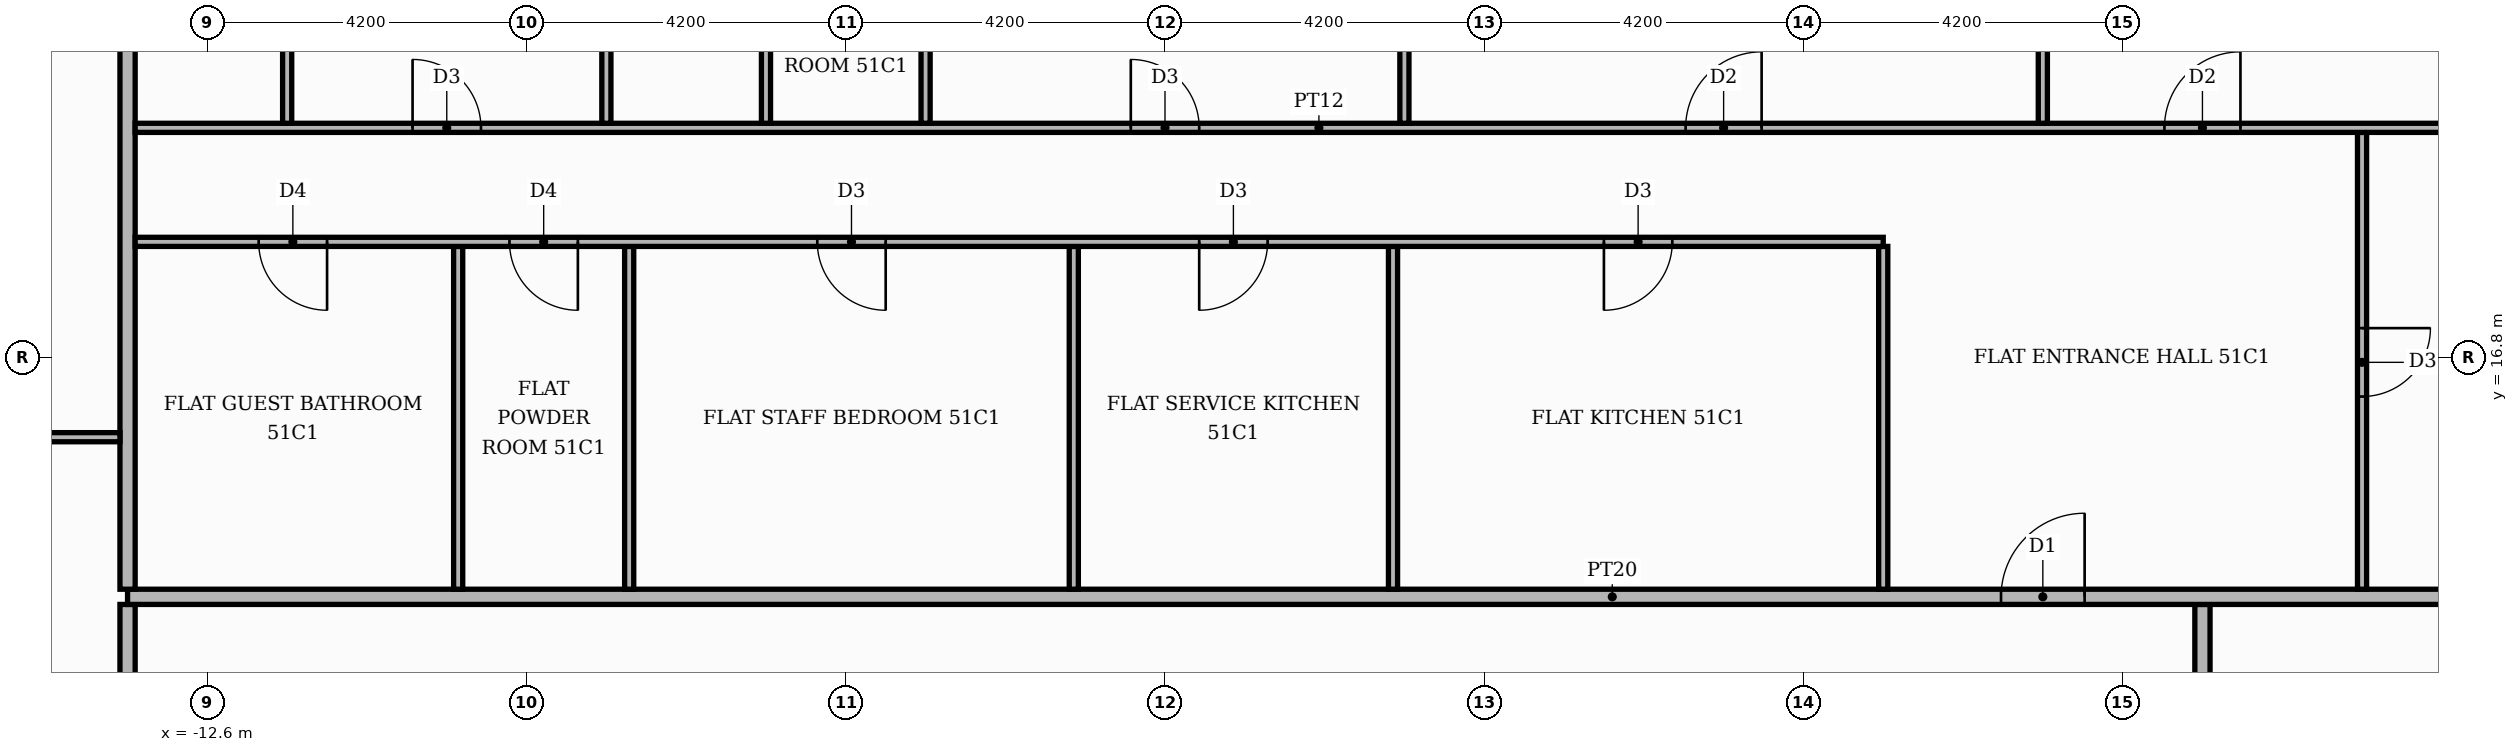
"""IFC4 building model, lengths in metres.
Left out: names, types, materials, properties, quantities, classifications, styles, units other than length and angle.
Written with IfcOpenShell. Run it as: python <this file> out.ifc"""

import sys

from ifc_helpers import new_model, si_unit, direction, frame, frame_2d, origin, place, context, subcontext, project, spatial, rectangle, extrude, element, fill, save


model = new_model("IFC4")
c1 = context("Model", 3, precision=1e-05, world=origin(), true_north=direction((0.0, 1.0)))
c2 = subcontext(c1, "Body", "Model", "MODEL_VIEW")
j1 = project(units=[si_unit("LENGTHUNIT", "METRE"), si_unit("PLANEANGLEUNIT", "RADIAN")], contexts=[c1])
p1 = place(None, origin())
s1 = spatial("IfcSite", under=j1, at=p1, CompositionType="ELEMENT")
p2 = place(p1, origin())
s2 = spatial("IfcBuilding", under=s1, at=p2, CompositionType="ELEMENT")
p3 = place(p2, frame((0.0, 0.0, 215.7)))
s3 = spatial("IfcBuildingStorey", under=s2, at=p3, CompositionType="ELEMENT", Elevation=215.7)
p4 = place(p3, frame((-13.65, 5.35, 0.0), z_axis=(0.0, 0.0, 1.0), x_axis=(0.0, 1.0, 0.0)))
e1 = element("IfcWall", 1, at=p4, inside=s3, PredefinedType="PARTITIONING", context=c2, shape_type="SweptSolid", body=[
    extrude(rectangle(XDim=8.2, YDim=0.2, at=frame_2d((4.1, 0.0))), origin(), (0.0, 0.0, 1.0), 3.48),
])
p5 = place(p4, frame((5.65, 0.0, 0.0)))
e2 = element("IfcOpeningElement", 2, at=p5, cuts=e1, PredefinedType="OPENING", context=c2, shape_type="SweptSolid", body=[
    extrude(rectangle(XDim=1.1, YDim=2.4, at=frame_2d((0.55, 1.2))), frame((0.0, 0.11, 0.0), z_axis=(0.0, -1.0, 0.0), x_axis=(1.0, 0.0, 0.0)), (0.0, 0.0, 1.0), 0.22),
])
p6 = place(p3, frame((13.65, 11.1, 0.0), z_axis=(0.0, 0.0, 1.0), x_axis=(0.0, 1.0, 0.0)))
e3 = element("IfcWall", 3, at=p6, inside=s3, PredefinedType="PARTITIONING", context=c2, shape_type="SweptSolid", body=[
    extrude(rectangle(XDim=2.45, YDim=0.2, at=frame_2d((1.225, 0.0))), origin(), (0.0, 0.0, 1.0), 3.48),
])
p7 = place(p3, frame((-13.65, 13.65, 0.0), z_axis=(0.0, 0.0, 1.0), x_axis=(1.0, 0.0, 0.0)))
e4 = element("IfcWall", 4, at=p7, inside=s3, PredefinedType="PARTITIONING", context=c2, shape_type="SweptSolid", body=[
    extrude(rectangle(XDim=39.07, YDim=0.2, at=frame_2d((19.535, 0.0))), origin(), (0.0, 0.0, 1.0), 3.48),
])
p8 = place(p7, frame((24.65, 0.0, 0.0)))
e5 = element("IfcOpeningElement", 5, at=p8, cuts=e4, PredefinedType="OPENING", context=c2, shape_type="SweptSolid", body=[
    extrude(rectangle(XDim=1.1, YDim=2.4, at=frame_2d((0.55, 1.2))), frame((0.0, 0.11, 0.0), z_axis=(0.0, -1.0, 0.0), x_axis=(1.0, 0.0, 0.0)), (0.0, 0.0, 1.0), 0.22),
])
p9 = place(p3, frame((-13.65, 13.75, 0.0), z_axis=(0.0, 0.0, 1.0), x_axis=(0.0, 1.0, 0.0)))
e6 = element("IfcWall", 6, at=p9, inside=s3, PredefinedType="PARTITIONING", context=c2, shape_type="SweptSolid", body=[
    extrude(rectangle(XDim=11.67, YDim=0.2, at=frame_2d((5.835, 0.0))), origin(), (0.0, 0.0, 1.0), 3.48),
])
for number, where, z_axis, x_axis in (
    (7, (-9.3, 13.75, 0.0), (0.0, 0.0, 1.0), (0.0, 1.0, 0.0)),
    (8, (-7.05, 13.75, 0.0), (0.0, 0.0, 1.0), (0.0, 1.0, 0.0)),
    (9, (-1.2, 13.75, 0.0), (0.0, 0.0, 1.0), (0.0, 1.0, 0.0)),
    (10, (3.0, 13.75, 0.0), (0.0, 0.0, 1.0), (0.0, 1.0, 0.0)),
    (11, (9.45, 13.75, 0.0), (0.0, 0.0, 1.0), (0.0, 1.0, 0.0)),
):
    element("IfcWall", number, at=place(p3, frame(where, z_axis=z_axis, x_axis=x_axis)), inside=s3, PredefinedType="PARTITIONING", context=c2, shape_type="SweptSolid", body=[
        extrude(rectangle(XDim=4.51, YDim=0.12, at=frame_2d((2.255, 0.0))), origin(), (0.0, 0.0, 1.0), 3.48),
    ])
p10 = place(p3, frame((15.75, 13.75, 0.0), z_axis=(0.0, 0.0, 1.0), x_axis=(0.0, 1.0, 0.0)))
e12 = element("IfcWall", 12, at=p10, inside=s3, PredefinedType="PARTITIONING", context=c2, shape_type="SweptSolid", body=[
    extrude(rectangle(XDim=6.01, YDim=0.12, at=frame_2d((3.005, 0.0))), origin(), (0.0, 0.0, 1.0), 3.48),
])
p11 = place(p10, frame((2.535, 0.0, 0.0)))
e13 = element("IfcOpeningElement", 13, at=p11, cuts=e12, PredefinedType="OPENING", context=c2, shape_type="SweptSolid", body=[
    extrude(rectangle(XDim=0.9, YDim=2.1, at=frame_2d((0.45, 1.05))), frame((0.0, 0.07, 0.0), z_axis=(0.0, -1.0, 0.0), x_axis=(1.0, 0.0, 0.0)), (0.0, 0.0, 1.0), 0.14),
])
p12 = place(p3, frame((-20.12, 15.75, 0.0), z_axis=(0.0, 0.0, 1.0), x_axis=(1.0, 0.0, 0.0)))
e14 = element("IfcWall", 14, at=p12, inside=s3, PredefinedType="PARTITIONING", context=c2, shape_type="SweptSolid", body=[
    extrude(rectangle(XDim=6.37, YDim=0.12, at=frame_2d((3.185, 0.0))), origin(), (0.0, 0.0, 1.0), 3.48),
])
p13 = place(p12, frame((2.735, 0.0, 0.0)))
e15 = element("IfcOpeningElement", 15, at=p13, cuts=e14, PredefinedType="OPENING", context=c2, shape_type="SweptSolid", body=[
    extrude(rectangle(XDim=1.0, YDim=2.1, at=frame_2d((0.5, 1.05))), frame((0.0, 0.07, 0.0), z_axis=(0.0, -1.0, 0.0), x_axis=(1.0, 0.0, 0.0)), (0.0, 0.0, 1.0), 0.14),
])
p14 = place(p3, frame((-13.55, 18.32, 0.0), z_axis=(0.0, 0.0, 1.0), x_axis=(1.0, 0.0, 0.0)))
e16 = element("IfcWall", 16, at=p14, inside=s3, PredefinedType="PARTITIONING", context=c2, shape_type="SweptSolid", body=[
    extrude(rectangle(XDim=23.0, YDim=0.12, at=frame_2d((11.5, 0.0))), origin(), (0.0, 0.0, 1.0), 3.48),
])
p15 = place(p14, frame((19.325, 0.0, 0.0)))
e17 = element("IfcOpeningElement", 17, at=p15, cuts=e16, PredefinedType="OPENING", context=c2, shape_type="SweptSolid", body=[
    extrude(rectangle(XDim=0.9, YDim=2.1, at=frame_2d((0.45, 1.05))), frame((0.0, 0.07, 0.0), z_axis=(0.0, -1.0, 0.0), x_axis=(1.0, 0.0, 0.0)), (0.0, 0.0, 1.0), 0.14),
])
p16 = place(p14, frame((14.0, 0.0, 0.0)))
e18 = element("IfcOpeningElement", 18, at=p16, cuts=e16, PredefinedType="OPENING", context=c2, shape_type="SweptSolid", body=[
    extrude(rectangle(XDim=0.9, YDim=2.1, at=frame_2d((0.45, 1.05))), frame((0.0, 0.07, 0.0), z_axis=(0.0, -1.0, 0.0), x_axis=(1.0, 0.0, 0.0)), (0.0, 0.0, 1.0), 0.14),
])
p17 = place(p14, frame((8.975, 0.0, 0.0)))
e19 = element("IfcOpeningElement", 19, at=p17, cuts=e16, PredefinedType="OPENING", context=c2, shape_type="SweptSolid", body=[
    extrude(rectangle(XDim=0.9, YDim=2.1, at=frame_2d((0.45, 1.05))), frame((0.0, 0.07, 0.0), z_axis=(0.0, -1.0, 0.0), x_axis=(1.0, 0.0, 0.0)), (0.0, 0.0, 1.0), 0.14),
])
p18 = place(p14, frame((4.925, 0.0, 0.0)))
e20 = element("IfcOpeningElement", 20, at=p18, cuts=e16, PredefinedType="OPENING", context=c2, shape_type="SweptSolid", body=[
    extrude(rectangle(XDim=0.9, YDim=2.1, at=frame_2d((0.45, 1.05))), frame((0.0, 0.07, 0.0), z_axis=(0.0, -1.0, 0.0), x_axis=(1.0, 0.0, 0.0)), (0.0, 0.0, 1.0), 0.14),
])
p19 = place(p14, frame((1.625, 0.0, 0.0)))
e21 = element("IfcOpeningElement", 21, at=p19, cuts=e16, PredefinedType="OPENING", context=c2, shape_type="SweptSolid", body=[
    extrude(rectangle(XDim=0.9, YDim=2.1, at=frame_2d((0.45, 1.05))), frame((0.0, 0.07, 0.0), z_axis=(0.0, -1.0, 0.0), x_axis=(1.0, 0.0, 0.0)), (0.0, 0.0, 1.0), 0.14),
])
p20 = place(p3, frame((-13.55, 19.82, 0.0), z_axis=(0.0, 0.0, 1.0), x_axis=(1.0, 0.0, 0.0)))
e22 = element("IfcWall", 22, at=p20, inside=s3, PredefinedType="PARTITIONING", context=c2, shape_type="SweptSolid", body=[
    extrude(rectangle(XDim=31.15, YDim=0.12, at=frame_2d((15.575, 0.0))), origin(), (0.0, 0.0, 1.0), 3.48),
])
p21 = place(p20, frame((26.7, 0.0, 0.0)))
e23 = element("IfcOpeningElement", 23, at=p21, cuts=e22, PredefinedType="OPENING", context=c2, shape_type="SweptSolid", body=[
    extrude(rectangle(XDim=1.0, YDim=2.1, at=frame_2d((0.5, 1.05))), frame((0.0, 0.07, 0.0), z_axis=(0.0, -1.0, 0.0), x_axis=(1.0, 0.0, 0.0)), (0.0, 0.0, 1.0), 0.14),
])
p22 = place(p20, frame((20.4, 0.0, 0.0)))
e24 = element("IfcOpeningElement", 24, at=p22, cuts=e22, PredefinedType="OPENING", context=c2, shape_type="SweptSolid", body=[
    extrude(rectangle(XDim=1.0, YDim=2.1, at=frame_2d((0.5, 1.05))), frame((0.0, 0.07, 0.0), z_axis=(0.0, -1.0, 0.0), x_axis=(1.0, 0.0, 0.0)), (0.0, 0.0, 1.0), 0.14),
])
p23 = place(p20, frame((13.1, 0.0, 0.0)))
e25 = element("IfcOpeningElement", 25, at=p23, cuts=e22, PredefinedType="OPENING", context=c2, shape_type="SweptSolid", body=[
    extrude(rectangle(XDim=0.9, YDim=2.1, at=frame_2d((0.45, 1.05))), frame((0.0, 0.07, 0.0), z_axis=(0.0, -1.0, 0.0), x_axis=(1.0, 0.0, 0.0)), (0.0, 0.0, 1.0), 0.14),
])
p24 = place(p20, frame((3.65, 0.0, 0.0)))
e26 = element("IfcOpeningElement", 26, at=p24, cuts=e22, PredefinedType="OPENING", context=c2, shape_type="SweptSolid", body=[
    extrude(rectangle(XDim=0.9, YDim=2.1, at=frame_2d((0.45, 1.05))), frame((0.0, 0.07, 0.0), z_axis=(0.0, -1.0, 0.0), x_axis=(1.0, 0.0, 0.0)), (0.0, 0.0, 1.0), 0.14),
])
p25 = place(p3, frame((-11.55, 19.88, 0.0), z_axis=(0.0, 0.0, 1.0), x_axis=(0.0, 1.0, 0.0)))
e27 = element("IfcWall", 27, at=p25, inside=s3, PredefinedType="PARTITIONING", context=c2, shape_type="SweptSolid", body=[
    extrude(rectangle(XDim=5.54, YDim=0.12, at=frame_2d((2.77, 0.0))), origin(), (0.0, 0.0, 1.0), 3.48),
])
p26 = place(p25, frame((2.44, 0.0, 0.0)))
e28 = element("IfcOpeningElement", 28, at=p26, cuts=e27, PredefinedType="OPENING", context=c2, shape_type="SweptSolid", body=[
    extrude(rectangle(XDim=0.9, YDim=2.1, at=frame_2d((0.45, 1.05))), frame((0.0, 0.07, 0.0), z_axis=(0.0, -1.0, 0.0), x_axis=(1.0, 0.0, 0.0)), (0.0, 0.0, 1.0), 0.14),
])
p27 = place(p3, frame((-7.35, 19.88, 0.0), z_axis=(0.0, 0.0, 1.0), x_axis=(0.0, 1.0, 0.0)))
e29 = element("IfcWall", 29, at=p27, inside=s3, PredefinedType="PARTITIONING", context=c2, shape_type="SweptSolid", body=[
    extrude(rectangle(XDim=5.54, YDim=0.12, at=frame_2d((2.77, 0.0))), origin(), (0.0, 0.0, 1.0), 3.48),
])
p28 = place(p3, frame((-5.25, 19.88, 0.0), z_axis=(0.0, 0.0, 1.0), x_axis=(0.0, 1.0, 0.0)))
e30 = element("IfcWall", 30, at=p28, inside=s3, PredefinedType="PARTITIONING", context=c2, shape_type="SweptSolid", body=[
    extrude(rectangle(XDim=5.54, YDim=0.12, at=frame_2d((2.77, 0.0))), origin(), (0.0, 0.0, 1.0), 3.48),
])
p29 = place(p28, frame((2.44, 0.0, 0.0)))
e31 = element("IfcOpeningElement", 31, at=p29, cuts=e30, PredefinedType="OPENING", context=c2, shape_type="SweptSolid", body=[
    extrude(rectangle(XDim=0.9, YDim=2.1, at=frame_2d((0.45, 1.05))), frame((0.0, 0.07, 0.0), z_axis=(0.0, -1.0, 0.0), x_axis=(1.0, 0.0, 0.0)), (0.0, 0.0, 1.0), 0.14),
])
p30 = place(p3, frame((-3.15, 19.88, 0.0), z_axis=(0.0, 0.0, 1.0), x_axis=(0.0, 1.0, 0.0)))
e32 = element("IfcWall", 32, at=p30, inside=s3, PredefinedType="PARTITIONING", context=c2, shape_type="SweptSolid", body=[
    extrude(rectangle(XDim=5.54, YDim=0.12, at=frame_2d((2.77, 0.0))), origin(), (0.0, 0.0, 1.0), 3.48),
])
p31 = place(p30, frame((2.44, 0.0, 0.0)))
e33 = element("IfcOpeningElement", 33, at=p31, cuts=e32, PredefinedType="OPENING", context=c2, shape_type="SweptSolid", body=[
    extrude(rectangle(XDim=0.9, YDim=2.1, at=frame_2d((0.45, 1.05))), frame((0.0, 0.07, 0.0), z_axis=(0.0, -1.0, 0.0), x_axis=(1.0, 0.0, 0.0)), (0.0, 0.0, 1.0), 0.14),
])
for number, where, z_axis, x_axis in (
    (34, (3.15, 19.88, 0.0), (0.0, 0.0, 1.0), (0.0, 1.0, 0.0)),
    (35, (11.55, 19.88, 0.0), (0.0, 0.0, 1.0), (0.0, 1.0, 0.0)),
):
    element("IfcWall", number, at=place(p3, frame(where, z_axis=z_axis, x_axis=x_axis)), inside=s3, PredefinedType="PARTITIONING", context=c2, shape_type="SweptSolid", body=[
        extrude(rectangle(XDim=5.54, YDim=0.12, at=frame_2d((2.77, 0.0))), origin(), (0.0, 0.0, 1.0), 3.48),
    ])
p32 = place(p8, origin())
e36 = element("IfcDoor", 36, at=p32, inside=s3, OperationType="SINGLE_SWING_RIGHT", PredefinedType="DOOR", context=c2, shape_type="SweptSolid", body=[
    extrude(rectangle(XDim=1.1, YDim=2.4, at=frame_2d((0.55, 1.2))), frame((0.0, 0.025, 0.0), z_axis=(0.0, -1.0, 0.0), x_axis=(1.0, 0.0, 0.0)), (0.0, 0.0, 1.0), 0.05),
])
fill(e5, e36)
p33 = place(p11, frame((0.9, 0.0, 0.0), z_axis=(0.0, 0.0, 1.0), x_axis=(-1.0, 0.0, 0.0)))
e37 = element("IfcDoor", 37, at=p33, inside=s3, OperationType="SINGLE_SWING_RIGHT", PredefinedType="DOOR", context=c2, shape_type="SweptSolid", body=[
    extrude(rectangle(XDim=0.9, YDim=2.1, at=frame_2d((0.45, 1.05))), frame((0.0, 0.025, 0.0), z_axis=(0.0, -1.0, 0.0), x_axis=(1.0, 0.0, 0.0)), (0.0, 0.0, 1.0), 0.05),
])
fill(e13, e37)
p34 = place(p15, frame((0.9, 0.0, 0.0), z_axis=(0.0, 0.0, 1.0), x_axis=(-1.0, 0.0, 0.0)))
e38 = element("IfcDoor", 38, at=p34, inside=s3, OperationType="SINGLE_SWING_LEFT", PredefinedType="DOOR", context=c2, shape_type="SweptSolid", body=[
    extrude(rectangle(XDim=0.9, YDim=2.1, at=frame_2d((0.45, 1.05))), frame((0.0, 0.025, 0.0), z_axis=(0.0, -1.0, 0.0), x_axis=(1.0, 0.0, 0.0)), (0.0, 0.0, 1.0), 0.05),
])
fill(e17, e38)
p35 = place(p16, frame((0.9, 0.0, 0.0), z_axis=(0.0, 0.0, 1.0), x_axis=(-1.0, 0.0, 0.0)))
e39 = element("IfcDoor", 39, at=p35, inside=s3, OperationType="SINGLE_SWING_LEFT", PredefinedType="DOOR", context=c2, shape_type="SweptSolid", body=[
    extrude(rectangle(XDim=0.9, YDim=2.1, at=frame_2d((0.45, 1.05))), frame((0.0, 0.025, 0.0), z_axis=(0.0, -1.0, 0.0), x_axis=(1.0, 0.0, 0.0)), (0.0, 0.0, 1.0), 0.05),
])
fill(e18, e39)
p36 = place(p17, frame((0.9, 0.0, 0.0), z_axis=(0.0, 0.0, 1.0), x_axis=(-1.0, 0.0, 0.0)))
e40 = element("IfcDoor", 40, at=p36, inside=s3, OperationType="SINGLE_SWING_RIGHT", PredefinedType="DOOR", context=c2, shape_type="SweptSolid", body=[
    extrude(rectangle(XDim=0.9, YDim=2.1, at=frame_2d((0.45, 1.05))), frame((0.0, 0.025, 0.0), z_axis=(0.0, -1.0, 0.0), x_axis=(1.0, 0.0, 0.0)), (0.0, 0.0, 1.0), 0.05),
])
fill(e19, e40)
p37 = place(p18, frame((0.9, 0.0, 0.0), z_axis=(0.0, 0.0, 1.0), x_axis=(-1.0, 0.0, 0.0)))
e41 = element("IfcDoor", 41, at=p37, inside=s3, OperationType="SINGLE_SWING_RIGHT", PredefinedType="DOOR", context=c2, shape_type="SweptSolid", body=[
    extrude(rectangle(XDim=0.9, YDim=2.1, at=frame_2d((0.45, 1.05))), frame((0.0, 0.025, 0.0), z_axis=(0.0, -1.0, 0.0), x_axis=(1.0, 0.0, 0.0)), (0.0, 0.0, 1.0), 0.05),
])
fill(e20, e41)
p38 = place(p19, frame((0.9, 0.0, 0.0), z_axis=(0.0, 0.0, 1.0), x_axis=(-1.0, 0.0, 0.0)))
e42 = element("IfcDoor", 42, at=p38, inside=s3, OperationType="SINGLE_SWING_RIGHT", PredefinedType="DOOR", context=c2, shape_type="SweptSolid", body=[
    extrude(rectangle(XDim=0.9, YDim=2.1, at=frame_2d((0.45, 1.05))), frame((0.0, 0.025, 0.0), z_axis=(0.0, -1.0, 0.0), x_axis=(1.0, 0.0, 0.0)), (0.0, 0.0, 1.0), 0.05),
])
fill(e21, e42)
p39 = place(p21, origin())
e43 = element("IfcDoor", 43, at=p39, inside=s3, OperationType="SINGLE_SWING_RIGHT", PredefinedType="DOOR", context=c2, shape_type="SweptSolid", body=[
    extrude(rectangle(XDim=1.0, YDim=2.1, at=frame_2d((0.5, 1.05))), frame((0.0, 0.025, 0.0), z_axis=(0.0, -1.0, 0.0), x_axis=(1.0, 0.0, 0.0)), (0.0, 0.0, 1.0), 0.05),
])
fill(e23, e43)
p40 = place(p22, origin())
e44 = element("IfcDoor", 44, at=p40, inside=s3, OperationType="SINGLE_SWING_RIGHT", PredefinedType="DOOR", context=c2, shape_type="SweptSolid", body=[
    extrude(rectangle(XDim=1.0, YDim=2.1, at=frame_2d((0.5, 1.05))), frame((0.0, 0.025, 0.0), z_axis=(0.0, -1.0, 0.0), x_axis=(1.0, 0.0, 0.0)), (0.0, 0.0, 1.0), 0.05),
])
fill(e24, e44)
p41 = place(p23, origin())
e45 = element("IfcDoor", 45, at=p41, inside=s3, OperationType="SINGLE_SWING_LEFT", PredefinedType="DOOR", context=c2, shape_type="SweptSolid", body=[
    extrude(rectangle(XDim=0.9, YDim=2.1, at=frame_2d((0.45, 1.05))), frame((0.0, 0.025, 0.0), z_axis=(0.0, -1.0, 0.0), x_axis=(1.0, 0.0, 0.0)), (0.0, 0.0, 1.0), 0.05),
])
fill(e25, e45)
p42 = place(p24, origin())
e46 = element("IfcDoor", 46, at=p42, inside=s3, OperationType="SINGLE_SWING_LEFT", PredefinedType="DOOR", context=c2, shape_type="SweptSolid", body=[
    extrude(rectangle(XDim=0.9, YDim=2.1, at=frame_2d((0.45, 1.05))), frame((0.0, 0.025, 0.0), z_axis=(0.0, -1.0, 0.0), x_axis=(1.0, 0.0, 0.0)), (0.0, 0.0, 1.0), 0.05),
])
fill(e26, e46)
save(model, sys.argv[1])
